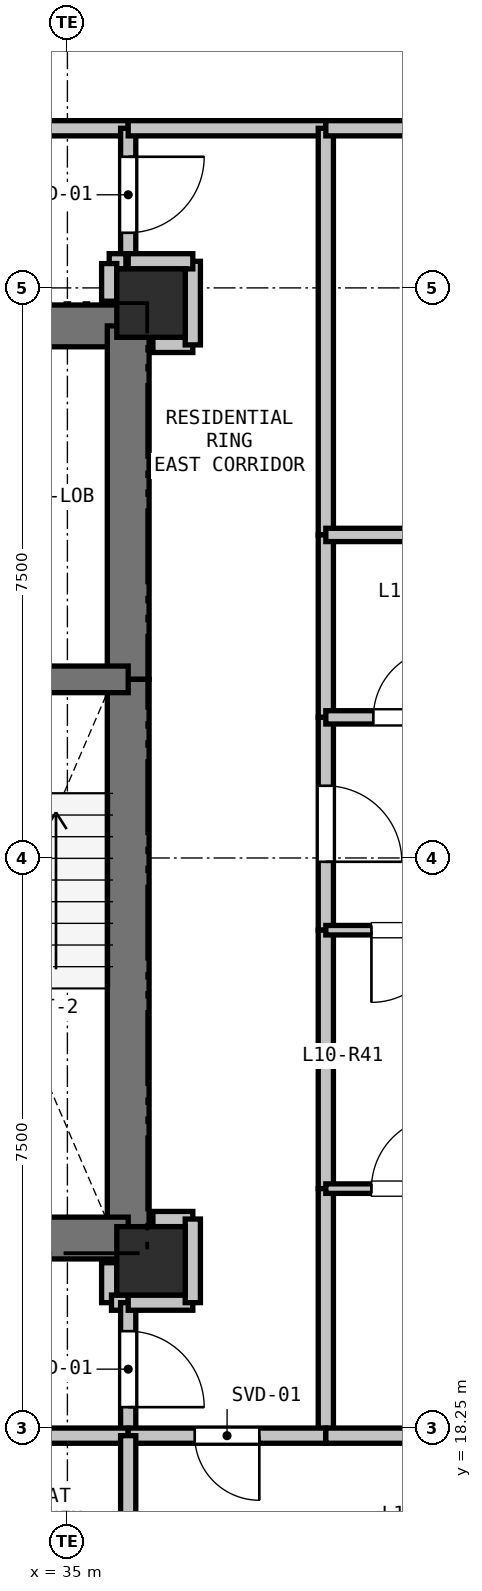
"""IFC4 building model, lengths in metres.
Left out: names, types, materials, properties, quantities, classifications, styles, units other than length and angle.
Written with IfcOpenShell. Run it as: python <this file> out.ifc"""

import sys

from ifc_helpers import new_model, si_unit, direction, frame, frame_2d, origin, origin_2d, place, context, subcontext, project, spatial, rectangle, extrude, element, fill, save


model = new_model("IFC4")
c1 = context("Model", 3, precision=1e-05, world=origin(), true_north=direction((0.0, 1.0)))
c2 = subcontext(c1, "Body", "Model", "MODEL_VIEW")
j1 = project(units=[si_unit("LENGTHUNIT", "METRE"), si_unit("PLANEANGLEUNIT", "RADIAN")], contexts=[c1])
p1 = place(None, origin())
s1 = spatial("IfcSite", under=j1, at=p1, CompositionType="ELEMENT")
p2 = place(p1, origin())
s2 = spatial("IfcBuilding", under=s1, at=p2, CompositionType="ELEMENT")
p3 = place(p2, frame((0.0, 0.0, 39.0)))
s3 = spatial("IfcBuildingStorey", under=s2, at=p3, CompositionType="ELEMENT", Elevation=39.0)
for number, where, z_axis, x_axis in (
    (1, (36.1, 33.05, 0.0), (0.0, 0.0, 1.0), (1.0, 0.0, 0.0)),
    (2, (36.1, 20.45, 0.0), (0.0, 0.0, 1.0), (1.0, 0.0, 0.0)),
):
    element("IfcColumn", number, at=place(p3, frame(where, z_axis=z_axis, x_axis=x_axis)), inside=s3, PredefinedType="COLUMN", context=c2, shape_type="SweptSolid", body=[
        extrude(rectangle(XDim=0.9, YDim=0.9, at=origin_2d()), origin(), (0.0, 0.0, 1.0), 3.3),
    ])
p4 = place(p3, frame((32.35, 32.75, 0.0), z_axis=(0.0, 0.0, 1.0), x_axis=(1.0, 0.0, 0.0)))
e3 = element("IfcWall", 3, at=p4, inside=s3, PredefinedType="SHEAR", context=c2, shape_type="SweptSolid", body=[
    extrude(rectangle(XDim=3.45, YDim=0.55, at=frame_2d((1.725, 0.0))), origin(), (0.0, 0.0, 1.0), 3.04),
])
p5 = place(p4, frame((0.65, 0.0, 0.0)))
e4 = element("IfcOpeningElement", 4, at=p5, cuts=e3, PredefinedType="OPENING", context=c2, shape_type="SweptSolid", body=[
    extrude(rectangle(XDim=1.15, YDim=2.15, at=frame_2d((0.575, 1.075))), frame((0.0, 0.285, 0.0), z_axis=(0.0, -1.0, 0.0), x_axis=(1.0, 0.0, 0.0)), (0.0, 0.0, 1.0), 0.57),
])
p6 = place(p3, frame((35.8, 32.75, 0.0), z_axis=(0.0, 0.0, 1.0), x_axis=(0.0, -1.0, 0.0)))
e5 = element("IfcWall", 5, at=p6, inside=s3, PredefinedType="SHEAR", context=c2, shape_type="SweptSolid", body=[
    extrude(rectangle(XDim=4.65, YDim=0.55, at=frame_2d((2.325, 0.0))), origin(), (0.0, 0.0, 1.0), 3.04),
])
p7 = place(p3, frame((35.8, 28.1, 0.0), z_axis=(0.0, 0.0, 1.0), x_axis=(0.0, -1.0, 0.0)))
e6 = element("IfcWall", 6, at=p7, inside=s3, PredefinedType="SHEAR", context=c2, shape_type="SweptSolid", body=[
    extrude(rectangle(XDim=7.35, YDim=0.55, at=frame_2d((3.675, 0.0))), origin(), (0.0, 0.0, 1.0), 3.04),
])
p8 = place(p3, frame((35.8, 20.75, 0.0), z_axis=(0.0, 0.0, 1.0), x_axis=(-1.0, 0.0, 0.0)))
e7 = element("IfcWall", 7, at=p8, inside=s3, PredefinedType="SHEAR", context=c2, shape_type="SweptSolid", body=[
    extrude(rectangle(XDim=3.45, YDim=0.55, at=frame_2d((1.725, 0.0))), origin(), (0.0, 0.0, 1.0), 3.04),
])
p9 = place(p3, frame((32.35, 28.1, 0.0), z_axis=(0.0, 0.0, 1.0), x_axis=(1.0, 0.0, 0.0)))
e8 = element("IfcWall", 8, at=p9, inside=s3, PredefinedType="SHEAR", context=c2, shape_type="SweptSolid", body=[
    extrude(rectangle(XDim=3.45, YDim=0.35, at=frame_2d((1.725, 0.0))), origin(), (0.0, 0.0, 1.0), 3.04),
])
p10 = place(p9, frame((1.15, 0.0, 0.0)))
e9 = element("IfcOpeningElement", 9, at=p10, cuts=e8, PredefinedType="OPENING", context=c2, shape_type="SweptSolid", body=[
    extrude(rectangle(XDim=1.15, YDim=2.15, at=frame_2d((0.575, 1.075))), frame((0.0, 0.185, 0.0), z_axis=(0.0, -1.0, 0.0), x_axis=(1.0, 0.0, 0.0)), (0.0, 0.0, 1.0), 0.37),
])
p11 = place(p3, frame((35.55, 20.425, 0.0), z_axis=(0.0, 0.0, 1.0), x_axis=(0.0, -1.0, 0.0)))
e10 = element("IfcWall", 10, at=p11, inside=s3, PredefinedType="PARTITIONING", context=c2, shape_type="SweptSolid", body=[
    extrude(rectangle(XDim=0.525, YDim=0.2, at=frame_2d((0.263, 0.0))), origin(), (0.0, 0.0, 1.0), 2.488),
])
p12 = place(p3, frame((35.58, 19.9, 0.0), z_axis=(0.0, 0.0, 1.0), x_axis=(1.0, 0.0, 0.0)))
e11 = element("IfcWall", 11, at=p12, inside=s3, PredefinedType="PARTITIONING", context=c2, shape_type="SweptSolid", body=[
    extrude(rectangle(XDim=0.22, YDim=0.2, at=frame_2d((0.11, 0.0))), origin(), (0.0, 0.0, 1.0), 3.04),
])
p13 = place(p3, frame((35.8, 19.9, 0.0), z_axis=(0.0, 0.0, 1.0), x_axis=(0.0, -1.0, 0.0)))
e12 = element("IfcWall", 12, at=p13, inside=s3, PredefinedType="PARTITIONING", context=c2, shape_type="SweptSolid", body=[
    extrude(rectangle(XDim=1.75, YDim=0.2, at=frame_2d((0.875, 0.0))), origin(), (0.0, 0.0, 1.0), 3.04),
])
p14 = place(p13, frame((0.375, 0.0, 0.0)))
e13 = element("IfcOpeningElement", 13, at=p14, cuts=e12, PredefinedType="OPENING", context=c2, shape_type="SweptSolid", body=[
    extrude(rectangle(XDim=1.0, YDim=2.15, at=frame_2d((0.5, 1.075))), frame((0.0, 0.11, 0.0), z_axis=(0.0, -1.0, 0.0), x_axis=(1.0, 0.0, 0.0)), (0.0, 0.0, 1.0), 0.22),
])
p15 = place(p3, frame((35.8, 18.15, 0.0), z_axis=(0.0, 0.0, 1.0), x_axis=(-1.0, 0.0, 0.0)))
e14 = element("IfcWall", 14, at=p15, inside=s3, PredefinedType="PARTITIONING", context=c2, shape_type="SweptSolid", body=[
    extrude(rectangle(XDim=3.6, YDim=0.2, at=frame_2d((1.8, 0.0))), origin(), (0.0, 0.0, 1.0), 3.04),
])
p16 = place(p3, frame((33.5, 35.35, 0.0), z_axis=(0.0, 0.0, 1.0), x_axis=(1.0, 0.0, 0.0)))
e15 = element("IfcWall", 15, at=p16, inside=s3, PredefinedType="PARTITIONING", context=c2, shape_type="SweptSolid", body=[
    extrude(rectangle(XDim=2.3, YDim=0.2, at=frame_2d((1.15, 0.0))), origin(), (0.0, 0.0, 1.0), 3.04),
])
p17 = place(p3, frame((35.8, 35.35, 0.0), z_axis=(0.0, 0.0, 1.0), x_axis=(0.0, -1.0, 0.0)))
e16 = element("IfcWall", 16, at=p17, inside=s3, PredefinedType="PARTITIONING", context=c2, shape_type="SweptSolid", body=[
    extrude(rectangle(XDim=1.75, YDim=0.2, at=frame_2d((0.875, 0.0))), origin(), (0.0, 0.0, 1.0), 3.04),
])
p18 = place(p17, frame((0.375, 0.0, 0.0)))
e17 = element("IfcOpeningElement", 17, at=p18, cuts=e16, PredefinedType="OPENING", context=c2, shape_type="SweptSolid", body=[
    extrude(rectangle(XDim=1.0, YDim=2.15, at=frame_2d((0.5, 1.075))), frame((0.0, 0.11, 0.0), z_axis=(0.0, -1.0, 0.0), x_axis=(1.0, 0.0, 0.0)), (0.0, 0.0, 1.0), 0.22),
])
p19 = place(p3, frame((35.77, 33.6, 0.0), z_axis=(0.0, 0.0, 1.0), x_axis=(-1.0, 0.0, 0.0)))
e18 = element("IfcWall", 18, at=p19, inside=s3, PredefinedType="PARTITIONING", context=c2, shape_type="SweptSolid", body=[
    extrude(rectangle(XDim=0.22, YDim=0.2, at=frame_2d((0.11, 0.0))), origin(), (0.0, 0.0, 1.0), 3.04),
])
p20 = place(p3, frame((35.55, 33.57, 0.0), z_axis=(0.0, 0.0, 1.0), x_axis=(0.0, -1.0, 0.0)))
e19 = element("IfcWall", 19, at=p20, inside=s3, PredefinedType="PARTITIONING", context=c2, shape_type="SweptSolid", body=[
    extrude(rectangle(XDim=0.495, YDim=0.2, at=frame_2d((0.248, 0.0))), origin(), (0.0, 0.0, 1.0), 2.488),
])
for number, where, z_axis, x_axis in (
    (20, (36.65, 21.0, 0.0), (0.0, 0.0, 1.0), (-1.0, 0.0, 0.0)),
    (21, (36.125, 32.5, 0.0), (0.0, 0.0, 1.0), (1.0, 0.0, 0.0)),
):
    element("IfcWall", number, at=place(p3, frame(where, z_axis=z_axis, x_axis=x_axis)), inside=s3, PredefinedType="PARTITIONING", context=c2, shape_type="SweptSolid", body=[
        extrude(rectangle(XDim=0.525, YDim=0.2, at=frame_2d((0.262, 0.0))), origin(), (0.0, 0.0, 1.0), 2.488),
    ])
p21 = place(p3, frame((36.65, 32.5, 0.0), z_axis=(0.0, 0.0, 1.0), x_axis=(0.0, 1.0, 0.0)))
e22 = element("IfcWall", 22, at=p21, inside=s3, PredefinedType="PARTITIONING", context=c2, shape_type="SweptSolid", body=[
    extrude(rectangle(XDim=1.1, YDim=0.2, at=frame_2d((0.55, 0.0))), origin(), (0.0, 0.0, 1.0), 2.337),
])
p22 = place(p3, frame((36.65, 33.6, 0.0), z_axis=(0.0, 0.0, 1.0), x_axis=(-1.0, 0.0, 0.0)))
e23 = element("IfcWall", 23, at=p22, inside=s3, PredefinedType="PARTITIONING", context=c2, shape_type="SweptSolid", body=[
    extrude(rectangle(XDim=0.85, YDim=0.2, at=frame_2d((0.425, 0.0))), origin(), (0.0, 0.0, 1.0), 2.337),
])
p23 = place(p3, frame((35.8, 35.35, 0.0), z_axis=(0.0, 0.0, 1.0), x_axis=(1.0, 0.0, 0.0)))
e24 = element("IfcWall", 24, at=p23, inside=s3, PredefinedType="PARTITIONING", context=c2, shape_type="SweptSolid", body=[
    extrude(rectangle(XDim=2.6, YDim=0.2, at=frame_2d((1.3, 0.0))), origin(), (0.0, 0.0, 1.0), 2.337),
])
p24 = place(p3, frame((38.4, 35.35, 0.0), z_axis=(0.0, 0.0, 1.0), x_axis=(0.0, -1.0, 0.0)))
e25 = element("IfcWall", 25, at=p24, inside=s3, PredefinedType="PARTITIONING", context=c2, shape_type="SweptSolid", body=[
    extrude(rectangle(XDim=5.35, YDim=0.2, at=frame_2d((2.675, 0.0))), origin(), (0.0, 0.0, 1.0), 2.337),
])
p25 = place(p3, frame((38.4, 30.0, 0.0), z_axis=(0.0, 0.0, 1.0), x_axis=(0.0, -1.0, 0.0)))
e26 = element("IfcWall", 26, at=p25, inside=s3, PredefinedType="PARTITIONING", context=c2, shape_type="SweptSolid", body=[
    extrude(rectangle(XDim=2.4, YDim=0.2, at=frame_2d((1.2, 0.0))), origin(), (0.0, 0.0, 1.0), 3.04),
])
p26 = place(p3, frame((38.4, 27.6, 0.0), z_axis=(0.0, 0.0, 1.0), x_axis=(0.0, -1.0, 0.0)))
e27 = element("IfcWall", 27, at=p26, inside=s3, PredefinedType="PARTITIONING", context=c2, shape_type="SweptSolid", body=[
    extrude(rectangle(XDim=2.8, YDim=0.2, at=frame_2d((1.4, 0.0))), origin(), (0.0, 0.0, 1.0), 3.04),
])
p27 = place(p26, frame((0.9, 0.0, 0.0)))
e28 = element("IfcOpeningElement", 28, at=p27, cuts=e27, PredefinedType="OPENING", context=c2, shape_type="SweptSolid", body=[
    extrude(rectangle(XDim=1.0, YDim=2.15, at=frame_2d((0.5, 1.075))), frame((0.0, 0.11, 0.0), z_axis=(0.0, -1.0, 0.0), x_axis=(1.0, 0.0, 0.0)), (0.0, 0.0, 1.0), 0.22),
])
p28 = place(p3, frame((38.4, 24.8, 0.0), z_axis=(0.0, 0.0, 1.0), x_axis=(0.0, -1.0, 0.0)))
e29 = element("IfcWall", 29, at=p28, inside=s3, PredefinedType="PARTITIONING", context=c2, shape_type="SweptSolid", body=[
    extrude(rectangle(XDim=3.4, YDim=0.2, at=frame_2d((1.7, 0.0))), origin(), (0.0, 0.0, 1.0), 3.04),
])
p29 = place(p3, frame((38.4, 21.4, 0.0), z_axis=(0.0, 0.0, 1.0), x_axis=(0.0, -1.0, 0.0)))
e30 = element("IfcWall", 30, at=p29, inside=s3, PredefinedType="PARTITIONING", context=c2, shape_type="SweptSolid", body=[
    extrude(rectangle(XDim=3.25, YDim=0.2, at=frame_2d((1.625, 0.0))), origin(), (0.0, 0.0, 1.0), 3.04),
])
p30 = place(p3, frame((38.4, 18.15, 0.0), z_axis=(0.0, 0.0, 1.0), x_axis=(-1.0, 0.0, 0.0)))
e31 = element("IfcWall", 31, at=p30, inside=s3, PredefinedType="PARTITIONING", context=c2, shape_type="SweptSolid", body=[
    extrude(rectangle(XDim=2.6, YDim=0.2, at=frame_2d((1.3, 0.0))), origin(), (0.0, 0.0, 1.0), 2.337),
])
p31 = place(p30, frame((0.875, 0.0, 0.0)))
e32 = element("IfcOpeningElement", 32, at=p31, cuts=e31, PredefinedType="OPENING", context=c2, shape_type="SweptSolid", body=[
    extrude(rectangle(XDim=0.85, YDim=2.1, at=frame_2d((0.425, 1.05))), frame((0.0, 0.11, 0.0), z_axis=(0.0, -1.0, 0.0), x_axis=(1.0, 0.0, 0.0)), (0.0, 0.0, 1.0), 0.22),
])
p32 = place(p3, frame((35.8, 19.9, 0.0), z_axis=(0.0, 0.0, 1.0), x_axis=(1.0, 0.0, 0.0)))
e33 = element("IfcWall", 33, at=p32, inside=s3, PredefinedType="PARTITIONING", context=c2, shape_type="SweptSolid", body=[
    extrude(rectangle(XDim=0.85, YDim=0.2, at=frame_2d((0.425, 0.0))), origin(), (0.0, 0.0, 1.0), 2.337),
])
p33 = place(p3, frame((36.65, 19.9, 0.0), z_axis=(0.0, 0.0, 1.0), x_axis=(0.0, 1.0, 0.0)))
e34 = element("IfcWall", 34, at=p33, inside=s3, PredefinedType="PARTITIONING", context=c2, shape_type="SweptSolid", body=[
    extrude(rectangle(XDim=1.1, YDim=0.2, at=frame_2d((0.55, 0.0))), origin(), (0.0, 0.0, 1.0), 3.04),
])
p34 = place(p3, frame((40.55, 24.8, 0.0), z_axis=(0.0, 0.0, 1.0), x_axis=(-1.0, 0.0, 0.0)))
e35 = element("IfcWall", 35, at=p34, inside=s3, PredefinedType="PARTITIONING", context=c2, shape_type="SweptSolid", body=[
    extrude(rectangle(XDim=2.15, YDim=0.125, at=frame_2d((1.075, 0.0))), origin(), (0.0, 0.0, 1.0), 3.04),
])
p35 = place(p34, frame((0.6, 0.0, 0.0)))
e36 = element("IfcOpeningElement", 36, at=p35, cuts=e35, PredefinedType="OPENING", context=c2, shape_type="SweptSolid", body=[
    extrude(rectangle(XDim=0.95, YDim=2.1, at=frame_2d((0.475, 1.05))), frame((0.0, 0.073, 0.0), z_axis=(0.0, -1.0, 0.0), x_axis=(1.0, 0.0, 0.0)), (0.0, 0.0, 1.0), 0.145),
])
p36 = place(p3, frame((38.4, 27.6, 0.0), z_axis=(0.0, 0.0, 1.0), x_axis=(1.0, 0.0, 0.0)))
e37 = element("IfcWall", 37, at=p36, inside=s3, PredefinedType="PLUMBINGWALL", context=c2, shape_type="SweptSolid", body=[
    extrude(rectangle(XDim=2.15, YDim=0.175, at=frame_2d((1.075, 0.0))), origin(), (0.0, 0.0, 1.0), 3.04),
])
p37 = place(p36, frame((0.625, 0.0, 0.0)))
e38 = element("IfcOpeningElement", 38, at=p37, cuts=e37, PredefinedType="OPENING", context=c2, shape_type="SweptSolid", body=[
    extrude(rectangle(XDim=0.9, YDim=2.1, at=frame_2d((0.45, 1.05))), frame((0.0, 0.097, 0.0), z_axis=(0.0, -1.0, 0.0), x_axis=(1.0, 0.0, 0.0)), (0.0, 0.0, 1.0), 0.195),
])
p38 = place(p3, frame((43.688, 35.35, 0.0), z_axis=(0.0, 0.0, 1.0), x_axis=(-1.0, 0.0, 0.0)))
e39 = element("IfcWall", 39, at=p38, inside=s3, PredefinedType="PARTITIONING", context=c2, shape_type="SweptSolid", body=[
    extrude(rectangle(XDim=5.289, YDim=0.2, at=frame_2d((2.644, 0.0))), origin(), (0.0, 0.0, 1.0), 2.337),
])
p39 = place(p3, frame((35.8, 18.15, 0.0), z_axis=(0.0, 0.0, 1.0), x_axis=(0.0, -1.0, 0.0)))
e40 = element("IfcWall", 40, at=p39, inside=s3, PredefinedType="PARTITIONING", context=c2, shape_type="SweptSolid", body=[
    extrude(rectangle(XDim=2.7, YDim=0.2, at=frame_2d((1.35, 0.0))), origin(), (0.0, 0.0, 1.0), 3.04),
])
p40 = place(p3, frame((38.4, 30.0, 0.0), z_axis=(0.0, 0.0, 1.0), x_axis=(1.0, 0.0, 0.0)))
e41 = element("IfcWall", 41, at=p40, inside=s3, PredefinedType="PLUMBINGWALL", context=c2, shape_type="SweptSolid", body=[
    extrude(rectangle(XDim=2.15, YDim=0.175, at=frame_2d((1.075, 0.0))), origin(), (0.0, 0.0, 1.0), 3.04),
])
p41 = place(p3, frame((38.4, 21.4, 0.0), z_axis=(0.0, 0.0, 1.0), x_axis=(1.0, 0.0, 0.0)))
e42 = element("IfcWall", 42, at=p41, inside=s3, PredefinedType="PARTITIONING", context=c2, shape_type="SweptSolid", body=[
    extrude(rectangle(XDim=2.15, YDim=0.125, at=frame_2d((1.075, 0.0))), origin(), (0.0, 0.0, 1.0), 3.04),
])
p42 = place(p41, frame((0.6, 0.0, 0.0)))
e43 = element("IfcOpeningElement", 43, at=p42, cuts=e42, PredefinedType="OPENING", context=c2, shape_type="SweptSolid", body=[
    extrude(rectangle(XDim=0.95, YDim=2.1, at=frame_2d((0.475, 1.05))), frame((0.0, 0.073, 0.0), z_axis=(0.0, -1.0, 0.0), x_axis=(1.0, 0.0, 0.0)), (0.0, 0.0, 1.0), 0.145),
])
p43 = place(p3, frame((43.688, 18.15, 0.0), z_axis=(0.0, 0.0, 1.0), x_axis=(-1.0, 0.0, 0.0)))
e44 = element("IfcWall", 44, at=p43, inside=s3, PredefinedType="PARTITIONING", context=c2, shape_type="SweptSolid", body=[
    extrude(rectangle(XDim=5.289, YDim=0.2, at=frame_2d((2.644, 0.0))), origin(), (0.0, 0.0, 1.0), 2.365),
])
p44 = place(p14, origin())
e45 = element("IfcDoor", 45, at=p44, inside=s3, OperationType="SINGLE_SWING_RIGHT", PredefinedType="DOOR", context=c2, shape_type="SweptSolid", body=[
    extrude(rectangle(XDim=1.0, YDim=2.15, at=frame_2d((0.5, 1.075))), frame((0.0, 0.025, 0.0), z_axis=(0.0, -1.0, 0.0), x_axis=(1.0, 0.0, 0.0)), (0.0, 0.0, 1.0), 0.05),
])
fill(e13, e45)
p45 = place(p18, origin())
e46 = element("IfcDoor", 46, at=p45, inside=s3, OperationType="SINGLE_SWING_LEFT", PredefinedType="DOOR", context=c2, shape_type="SweptSolid", body=[
    extrude(rectangle(XDim=1.0, YDim=2.15, at=frame_2d((0.5, 1.075))), frame((0.0, 0.025, 0.0), z_axis=(0.0, -1.0, 0.0), x_axis=(1.0, 0.0, 0.0)), (0.0, 0.0, 1.0), 0.05),
])
fill(e17, e46)
p46 = place(p27, origin())
e47 = element("IfcDoor", 47, at=p46, inside=s3, OperationType="SINGLE_SWING_RIGHT", PredefinedType="DOOR", context=c2, shape_type="SweptSolid", body=[
    extrude(rectangle(XDim=1.0, YDim=2.15, at=frame_2d((0.5, 1.075))), frame((0.0, 0.025, 0.0), z_axis=(0.0, -1.0, 0.0), x_axis=(1.0, 0.0, 0.0)), (0.0, 0.0, 1.0), 0.05),
])
fill(e28, e47)
p47 = place(p31, origin())
e48 = element("IfcDoor", 48, at=p47, inside=s3, OperationType="SINGLE_SWING_LEFT", PredefinedType="DOOR", context=c2, shape_type="SweptSolid", body=[
    extrude(rectangle(XDim=0.85, YDim=2.1, at=frame_2d((0.425, 1.05))), frame((0.0, 0.025, 0.0), z_axis=(0.0, -1.0, 0.0), x_axis=(1.0, 0.0, 0.0)), (0.0, 0.0, 1.0), 0.05),
])
fill(e32, e48)
p48 = place(p37, origin())
e49 = element("IfcDoor", 49, at=p48, inside=s3, OperationType="SINGLE_SWING_RIGHT", PredefinedType="DOOR", context=c2, shape_type="SweptSolid", body=[
    extrude(rectangle(XDim=0.9, YDim=2.1, at=frame_2d((0.45, 1.05))), frame((0.0, 0.025, 0.0), z_axis=(0.0, -1.0, 0.0), x_axis=(1.0, 0.0, 0.0)), (0.0, 0.0, 1.0), 0.05),
])
fill(e38, e49)
p49 = place(p35, origin())
e50 = element("IfcDoor", 50, at=p49, inside=s3, OperationType="SINGLE_SWING_RIGHT", PredefinedType="DOOR", context=c2, shape_type="SweptSolid", body=[
    extrude(rectangle(XDim=0.95, YDim=2.1, at=frame_2d((0.475, 1.05))), frame((0.0, 0.025, 0.0), z_axis=(0.0, -1.0, 0.0), x_axis=(1.0, 0.0, 0.0)), (0.0, 0.0, 1.0), 0.05),
])
fill(e36, e50)
p50 = place(p42, origin())
e51 = element("IfcDoor", 51, at=p50, inside=s3, OperationType="SINGLE_SWING_RIGHT", PredefinedType="DOOR", context=c2, shape_type="SweptSolid", body=[
    extrude(rectangle(XDim=0.95, YDim=2.1, at=frame_2d((0.475, 1.05))), frame((0.0, 0.025, 0.0), z_axis=(0.0, -1.0, 0.0), x_axis=(1.0, 0.0, 0.0)), (0.0, 0.0, 1.0), 0.05),
])
fill(e43, e51)
save(model, sys.argv[1])
